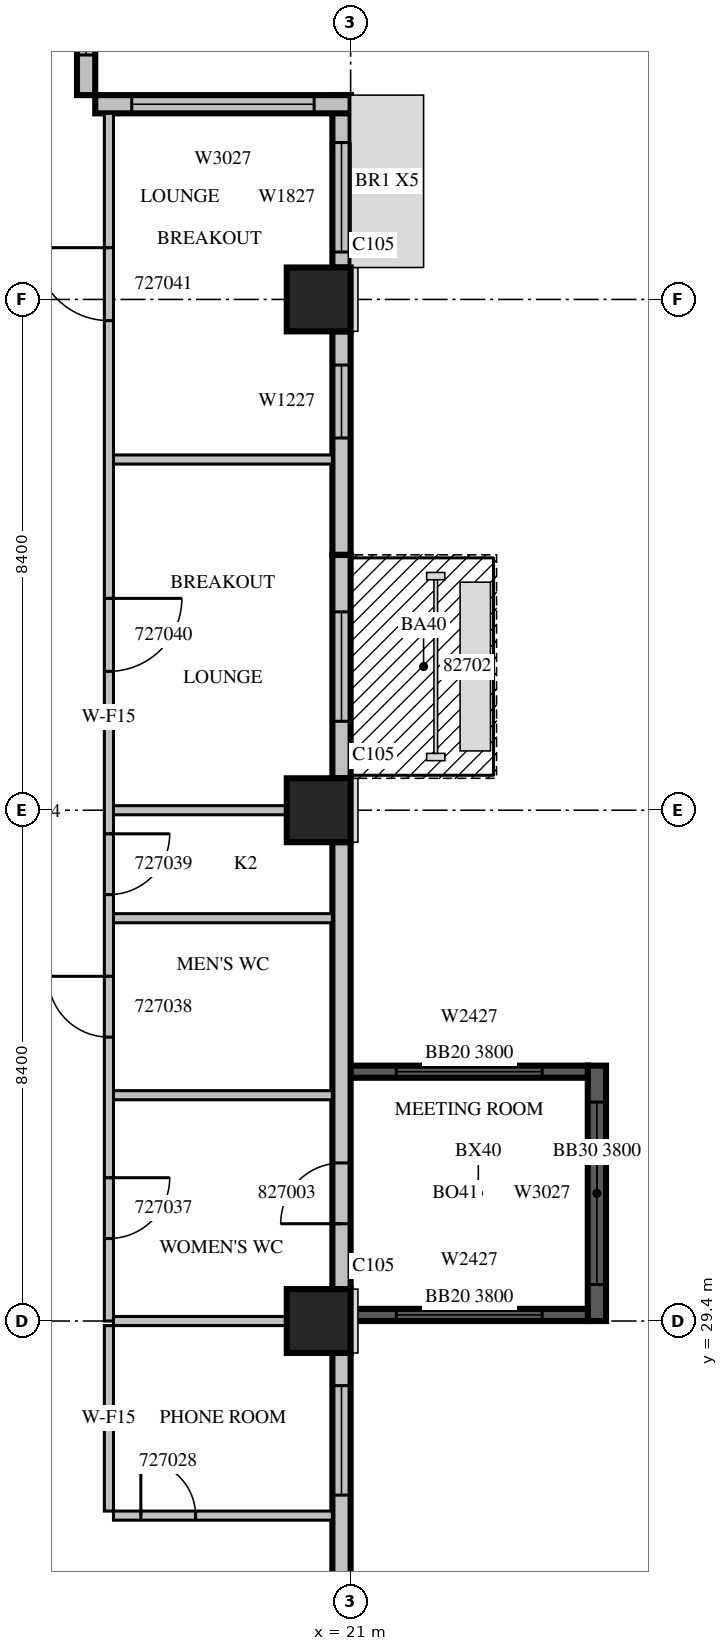
"""IFC4 building model, lengths in metres.
Left out: names, types, materials, properties, quantities, classifications, styles, units other than length and angle.
Written with IfcOpenShell. Run it as: python <this file> out.ifc"""

import sys

from ifc_helpers import new_model, si_unit, direction, frame, frame_2d, origin, origin_2d, place, context, subcontext, project, spatial, rectangle, extrude, source, transform, mapped, element, fill, save


model = new_model("IFC4")
c1 = context("Model", 3, precision=1e-05, world=origin(), true_north=direction((0.0, 1.0)))
c2 = subcontext(c1, "Body", "Model", "MODEL_VIEW")
j1 = project(units=[si_unit("LENGTHUNIT", "METRE"), si_unit("PLANEANGLEUNIT", "RADIAN")], contexts=[c1])
p1 = place(None, origin())
s1 = spatial("IfcSite", under=j1, at=p1, CompositionType="ELEMENT")
p2 = place(p1, origin())
s2 = spatial("IfcBuilding", under=s1, at=p2, CompositionType="ELEMENT")
p3 = place(p2, frame((0.0, 0.0, 124.5)))
s3 = spatial("IfcBuildingStorey", under=s2, at=p3, CompositionType="ELEMENT", Elevation=124.5)
m1 = source(origin(), c2, "Body", "SweptSolid", [
    extrude(rectangle(XDim=1.05, YDim=1.05, at=origin_2d()), origin(), (0.0, 0.0, 1.0), 4.2),
])
for number, where, z_axis, x_axis in (
    (1, (20.475, 29.4, 0.0), (0.0, 0.0, 1.0), (1.0, 0.0, 0.0)),
    (2, (20.475, 37.8, 0.0), (0.0, 0.0, 1.0), (1.0, 0.0, 0.0)),
    (3, (20.475, 46.2, 0.0), (0.0, 0.0, 1.0), (1.0, 0.0, 0.0)),
):
    element("IfcColumn", number, at=place(p3, frame(where, z_axis=z_axis, x_axis=x_axis)), inside=s3, PredefinedType="COLUMN", context=c2, shape_type="MappedRepresentation", body=[
        mapped(m1, transform((0.0, 0.0, 0.0), scale=1.0)),
    ])
m2 = source(origin(), c2, "Body", "SweptSolid", [
    extrude(rectangle(XDim=4.2, YDim=0.3, at=frame_2d((2.1, 0.0))), origin(), (0.0, 0.0, 1.0), 3.8),
])
p4 = place(p3, frame((25.05, 29.4, 0.0), z_axis=(0.0, 0.0, 1.0), x_axis=(0.0, 1.0, 0.0)))
e4 = element("IfcWall", 4, at=p4, inside=s3, PredefinedType="SOLIDWALL", context=c2, shape_type="MappedRepresentation", body=[
    mapped(m2, transform((0.0, 0.0, 0.0), scale=1.0)),
])
m3 = source(origin(), c2, "Body", "SweptSolid", [
    extrude(rectangle(XDim=3.0, YDim=2.7, at=frame_2d((1.5, 1.35))), frame((0.0, 0.16, 0.0), z_axis=(0.0, -1.0, 0.0), x_axis=(1.0, 0.0, 0.0)), (0.0, 0.0, 1.0), 0.32),
])
p5 = place(p4, frame((0.6, 0.0, 0.6)))
e5 = element("IfcOpeningElement", 5, at=p5, cuts=e4, PredefinedType="OPENING", context=c2, shape_type="MappedRepresentation", body=[
    mapped(m3, transform((0.0, 0.0, 0.0), scale=1.0)),
])
m4 = source(origin(), c2, "Body", "SweptSolid", [
    extrude(rectangle(XDim=3.9, YDim=0.2, at=frame_2d((1.95, 0.0))), origin(), (0.0, 0.0, 1.0), 3.8),
])
p6 = place(p3, frame((21.0, 29.5, 0.0), z_axis=(0.0, 0.0, 1.0), x_axis=(1.0, 0.0, 0.0)))
e6 = element("IfcWall", 6, at=p6, inside=s3, PredefinedType="SOLIDWALL", context=c2, shape_type="MappedRepresentation", body=[
    mapped(m4, transform((0.0, 0.0, 0.0), scale=1.0)),
])
m5 = source(origin(), c2, "Body", "SweptSolid", [
    extrude(rectangle(XDim=2.4, YDim=2.7, at=frame_2d((1.2, 1.35))), frame((0.0, 0.11, 0.0), z_axis=(0.0, -1.0, 0.0), x_axis=(1.0, 0.0, 0.0)), (0.0, 0.0, 1.0), 0.22),
])
p7 = place(p6, frame((0.75, 0.0, 0.6)))
e7 = element("IfcOpeningElement", 7, at=p7, cuts=e6, PredefinedType="OPENING", context=c2, shape_type="MappedRepresentation", body=[
    mapped(m5, transform((0.0, 0.0, 0.0), scale=1.0)),
])
p8 = place(p3, frame((21.0, 33.5, 0.0), z_axis=(0.0, 0.0, 1.0), x_axis=(1.0, 0.0, 0.0)))
e8 = element("IfcWall", 8, at=p8, inside=s3, PredefinedType="SOLIDWALL", context=c2, shape_type="MappedRepresentation", body=[
    mapped(m4, transform((0.0, 0.0, 0.0), scale=1.0)),
])
p9 = place(p8, frame((0.75, 0.0, 0.6)))
e9 = element("IfcOpeningElement", 9, at=p9, cuts=e8, PredefinedType="OPENING", context=c2, shape_type="MappedRepresentation", body=[
    mapped(m5, transform((0.0, 0.0, 0.0), scale=1.0)),
])
m6 = source(origin(), c2, "Body", "SweptSolid", [
    extrude(rectangle(XDim=6.875, YDim=0.3, at=frame_2d((3.438, 0.0))), origin(), (0.0, 0.0, 1.0), 3.8),
])
p10 = place(p3, frame((20.85, 22.0, 0.0), z_axis=(0.0, 0.0, 1.0), x_axis=(0.0, 1.0, 0.0)))
e10 = element("IfcWall", 10, at=p10, inside=s3, PredefinedType="STANDARD", context=c2, shape_type="MappedRepresentation", body=[
    mapped(m6, transform((0.0, 0.0, 0.0), scale=1.0)),
])
m7 = source(origin(), c2, "Body", "SweptSolid", [
    extrude(rectangle(XDim=1.8, YDim=2.7, at=frame_2d((0.9, 1.35))), frame((0.0, 0.16, 0.0), z_axis=(0.0, -1.0, 0.0), x_axis=(1.0, 0.0, 0.0)), (0.0, 0.0, 1.0), 0.32),
])
p11 = place(p10, frame((0.2, 0.0, 0.6)))
e11 = element("IfcOpeningElement", 11, at=p11, cuts=e10, PredefinedType="OPENING", context=c2, shape_type="MappedRepresentation", body=[
    mapped(m7, transform((0.0, 0.0, 0.0), scale=1.0)),
])
p12 = place(p10, frame((4.537, 0.0, 0.6)))
e12 = element("IfcOpeningElement", 12, at=p12, cuts=e10, PredefinedType="OPENING", context=c2, shape_type="MappedRepresentation", body=[
    mapped(m7, transform((0.0, 0.0, 0.0), scale=1.0)),
])
m8 = source(origin(), c2, "Body", "SweptSolid", [
    extrude(rectangle(XDim=7.35, YDim=0.3, at=frame_2d((3.675, 0.0))), origin(), (0.0, 0.0, 1.0), 3.8),
])
p13 = place(p3, frame((20.85, 29.925, 0.0), z_axis=(0.0, 0.0, 1.0), x_axis=(0.0, 1.0, 0.0)))
e13 = element("IfcWall", 13, at=p13, inside=s3, PredefinedType="STANDARD", context=c2, shape_type="MappedRepresentation", body=[
    mapped(m8, transform((0.0, 0.0, 0.0), scale=1.0)),
])
m9 = source(origin(), c2, "Body", "SweptSolid", [
    extrude(rectangle(XDim=1.0, YDim=2.1, at=frame_2d((0.5, 1.05))), frame((0.0, 0.16, 0.0), z_axis=(0.0, -1.0, 0.0), x_axis=(1.0, 0.0, 0.0)), (0.0, 0.0, 1.0), 0.32),
])
p14 = place(p13, frame((1.075, 0.0, 0.0)))
e14 = element("IfcOpeningElement", 14, at=p14, cuts=e13, PredefinedType="OPENING", context=c2, shape_type="MappedRepresentation", body=[
    mapped(m9, transform((0.0, 0.0, 0.0), scale=1.0)),
])
m10 = source(origin(), c2, "Body", "SweptSolid", [
    extrude(rectangle(XDim=3.675, YDim=0.3, at=frame_2d((1.837, 0.0))), origin(), (0.0, 0.0, 1.0), 3.8),
])
p15 = place(p3, frame((20.85, 38.325, 0.0), z_axis=(0.0, 0.0, 1.0), x_axis=(0.0, 1.0, 0.0)))
e15 = element("IfcWall", 15, at=p15, inside=s3, PredefinedType="STANDARD", context=c2, shape_type="MappedRepresentation", body=[
    mapped(m10, transform((0.0, 0.0, 0.0), scale=1.0)),
])
m11 = source(origin(), c2, "Body", "SweptSolid", [
    extrude(rectangle(XDim=1.8, YDim=2.4, at=frame_2d((0.9, 1.2))), frame((0.0, 0.16, 0.0), z_axis=(0.0, -1.0, 0.0), x_axis=(1.0, 0.0, 0.0)), (0.0, 0.0, 1.0), 0.32),
])
p16 = place(p15, frame((0.938, 0.0, 0.0)))
e16 = element("IfcOpeningElement", 16, at=p16, cuts=e15, PredefinedType="OPENING", context=c2, shape_type="MappedRepresentation", body=[
    mapped(m11, transform((0.0, 0.0, 0.0), scale=1.0)),
])
p17 = place(p3, frame((20.85, 42.0, 0.0), z_axis=(0.0, 0.0, 1.0), x_axis=(0.0, 1.0, 0.0)))
e17 = element("IfcWall", 17, at=p17, inside=s3, PredefinedType="STANDARD", context=c2, shape_type="MappedRepresentation", body=[
    mapped(m10, transform((0.0, 0.0, 0.0), scale=1.0)),
])
m12 = source(origin(), c2, "Body", "SweptSolid", [
    extrude(rectangle(XDim=1.2, YDim=2.7, at=frame_2d((0.6, 1.35))), frame((0.0, 0.16, 0.0), z_axis=(0.0, -1.0, 0.0), x_axis=(1.0, 0.0, 0.0)), (0.0, 0.0, 1.0), 0.32),
])
p18 = place(p17, frame((1.921, 0.0, 0.6)))
e18 = element("IfcOpeningElement", 18, at=p18, cuts=e17, PredefinedType="OPENING", context=c2, shape_type="MappedRepresentation", body=[
    mapped(m12, transform((0.0, 0.0, 0.0), scale=1.0)),
])
m13 = source(origin(), c2, "Body", "SweptSolid", [
    extrude(rectangle(XDim=2.835, YDim=0.3, at=frame_2d((1.417, 0.0))), origin(), (0.0, 0.0, 1.0), 3.8),
])
p19 = place(p3, frame((20.85, 46.725, 0.0), z_axis=(0.0, 0.0, 1.0), x_axis=(0.0, 1.0, 0.0)))
e19 = element("IfcWall", 19, at=p19, inside=s3, PredefinedType="STANDARD", context=c2, shape_type="MappedRepresentation", body=[
    mapped(m13, transform((0.0, 0.0, 0.0), scale=1.0)),
])
p20 = place(p19, frame((0.255, 0.0, 0.6)))
e20 = element("IfcOpeningElement", 20, at=p20, cuts=e19, PredefinedType="OPENING", context=c2, shape_type="MappedRepresentation", body=[
    mapped(m7, transform((0.0, 0.0, 0.0), scale=1.0)),
])
m14 = source(origin(), c2, "Body", "SweptSolid", [
    extrude(rectangle(XDim=4.2, YDim=0.3, at=frame_2d((2.1, 0.0))), origin(), (0.0, 0.0, 1.0), 3.8),
])
p21 = place(p3, frame((21.0, 49.41, 0.0), z_axis=(0.0, 0.0, 1.0), x_axis=(-1.0, 0.0, 0.0)))
e21 = element("IfcWall", 21, at=p21, inside=s3, PredefinedType="STANDARD", context=c2, shape_type="MappedRepresentation", body=[
    mapped(m14, transform((0.0, 0.0, 0.0), scale=1.0)),
])
p22 = place(p21, frame((0.6, 0.0, 0.6)))
e22 = element("IfcOpeningElement", 22, at=p22, cuts=e21, PredefinedType="OPENING", context=c2, shape_type="MappedRepresentation", body=[
    mapped(m3, transform((0.0, 0.0, 0.0), scale=1.0)),
])
m15 = source(origin(), c2, "Body", "SweptSolid", [
    extrude(rectangle(XDim=2.52, YDim=0.3, at=frame_2d((1.26, 0.0))), origin(), (0.0, 0.0, 1.0), 3.8),
])
p23 = place(p3, frame((16.65, 49.56, 0.0), z_axis=(0.0, 0.0, 1.0), x_axis=(0.0, 1.0, 0.0)))
e23 = element("IfcWall", 23, at=p23, inside=s3, PredefinedType="STANDARD", context=c2, shape_type="MappedRepresentation", body=[
    mapped(m15, transform((0.0, 0.0, 0.0), scale=1.0)),
])
p24 = place(p23, frame((0.66, 0.0, 0.6)))
e24 = element("IfcOpeningElement", 24, at=p24, cuts=e23, PredefinedType="OPENING", context=c2, shape_type="MappedRepresentation", body=[
    mapped(m12, transform((0.0, 0.0, 0.0), scale=1.0)),
])
m16 = source(origin(), c2, "Body", "SweptSolid", [
    extrude(rectangle(XDim=3.6, YDim=0.15, at=frame_2d((1.8, 0.0))), origin(), (0.0, 0.0, 1.0), 3.8),
])
p25 = place(p3, frame((17.1, 26.2, 0.0), z_axis=(0.0, 0.0, 1.0), x_axis=(1.0, 0.0, 0.0)))
e25 = element("IfcWall", 25, at=p25, inside=s3, PredefinedType="PARTITIONING", context=c2, shape_type="MappedRepresentation", body=[
    mapped(m16, transform((0.0, 0.0, 0.0), scale=1.0)),
])
m17 = source(origin(), c2, "Body", "SweptSolid", [
    extrude(rectangle(XDim=0.9, YDim=2.1, at=frame_2d((0.45, 1.05))), frame((0.0, 0.085, 0.0), z_axis=(0.0, -1.0, 0.0), x_axis=(1.0, 0.0, 0.0)), (0.0, 0.0, 1.0), 0.17),
])
p26 = place(p25, frame((0.45, 0.0, 0.0)))
e26 = element("IfcOpeningElement", 26, at=p26, cuts=e25, PredefinedType="OPENING", context=c2, shape_type="MappedRepresentation", body=[
    mapped(m17, transform((0.0, 0.0, 0.0), scale=1.0)),
])
m18 = source(origin(), c2, "Body", "SweptSolid", [
    extrude(rectangle(XDim=3.05, YDim=0.15, at=frame_2d((1.525, 0.0))), origin(), (0.0, 0.0, 1.0), 3.8),
])
p27 = place(p3, frame((17.025, 29.325, 0.0), z_axis=(0.0, 0.0, 1.0), x_axis=(0.0, -1.0, 0.0)))
e27 = element("IfcWall", 27, at=p27, inside=s3, PredefinedType="PARTITIONING", context=c2, shape_type="MappedRepresentation", body=[
    mapped(m18, transform((0.0, 0.0, 0.0), scale=1.0)),
])
m19 = source(origin(), c2, "Body", "SweptSolid", [
    extrude(rectangle(XDim=2.851, YDim=0.15, at=frame_2d((1.425, 0.0))), origin(), (0.0, 0.0, 1.0), 3.8),
])
p28 = place(p3, frame((19.951, 29.4, 0.0), z_axis=(0.0, 0.0, 1.0), x_axis=(-1.0, 0.0, 0.0)))
e28 = element("IfcWall", 28, at=p28, inside=s3, PredefinedType="PARTITIONING", context=c2, shape_type="MappedRepresentation", body=[
    mapped(m19, transform((0.0, 0.0, 0.0), scale=1.0)),
])
for number, where, z_axis, x_axis in (
    (29, (17.1, 33.113, 0.0), (0.0, 0.0, 1.0), (1.0, 0.0, 0.0)),
    (30, (17.1, 36.024, 0.0), (0.0, 0.0, 1.0), (1.0, 0.0, 0.0)),
    (31, (17.1, 43.568, 0.0), (0.0, 0.0, 1.0), (1.0, 0.0, 0.0)),
):
    element("IfcWall", number, at=place(p3, frame(where, z_axis=z_axis, x_axis=x_axis)), inside=s3, PredefinedType="PARTITIONING", context=c2, shape_type="MappedRepresentation", body=[
        mapped(m16, transform((0.0, 0.0, 0.0), scale=1.0)),
    ])
p29 = place(p3, frame((19.951, 37.8, 0.0), z_axis=(0.0, 0.0, 1.0), x_axis=(-1.0, 0.0, 0.0)))
e32 = element("IfcWall", 32, at=p29, inside=s3, PredefinedType="PARTITIONING", context=c2, shape_type="MappedRepresentation", body=[
    mapped(m19, transform((0.0, 0.0, 0.0), scale=1.0)),
])
m20 = source(origin(), c2, "Body", "SweptSolid", [
    extrude(rectangle(XDim=19.86, YDim=0.15, at=frame_2d((9.93, 0.0))), origin(), (0.0, 0.0, 1.0), 3.8),
])
p30 = place(p3, frame((17.025, 49.26, 0.0), z_axis=(0.0, 0.0, 1.0), x_axis=(0.0, -1.0, 0.0)))
e33 = element("IfcWall", 33, at=p30, inside=s3, PredefinedType="PARTITIONING", context=c2, shape_type="MappedRepresentation", body=[
    mapped(m20, transform((0.0, 0.0, 0.0), scale=1.0)),
])
m21 = source(origin(), c2, "Body", "SweptSolid", [
    extrude(rectangle(XDim=1.0, YDim=2.1, at=frame_2d((0.5, 1.05))), frame((0.0, 0.085, 0.0), z_axis=(0.0, -1.0, 0.0), x_axis=(1.0, 0.0, 0.0)), (0.0, 0.0, 1.0), 0.17),
])
p31 = place(p30, frame((17.503, 0.0, 0.0)))
e34 = element("IfcOpeningElement", 34, at=p31, cuts=e33, PredefinedType="OPENING", context=c2, shape_type="MappedRepresentation", body=[
    mapped(m21, transform((0.0, 0.0, 0.0), scale=1.0)),
])
p32 = place(p30, frame((14.191, 0.0, 0.0)))
e35 = element("IfcOpeningElement", 35, at=p32, cuts=e33, PredefinedType="OPENING", context=c2, shape_type="MappedRepresentation", body=[
    mapped(m21, transform((0.0, 0.0, 0.0), scale=1.0)),
])
p33 = place(p30, frame((11.848, 0.0, 0.0)))
e36 = element("IfcOpeningElement", 36, at=p33, cuts=e33, PredefinedType="OPENING", context=c2, shape_type="MappedRepresentation", body=[
    mapped(m21, transform((0.0, 0.0, 0.0), scale=1.0)),
])
m22 = source(origin(), c2, "Body", "SweptSolid", [
    extrude(rectangle(XDim=1.2, YDim=2.1, at=frame_2d((0.6, 1.05))), frame((0.0, 0.085, 0.0), z_axis=(0.0, -1.0, 0.0), x_axis=(1.0, 0.0, 0.0)), (0.0, 0.0, 1.0), 0.17),
])
p34 = place(p30, frame((7.976, 0.0, 0.0)))
e37 = element("IfcOpeningElement", 37, at=p34, cuts=e33, PredefinedType="OPENING", context=c2, shape_type="MappedRepresentation", body=[
    mapped(m22, transform((0.0, 0.0, 0.0), scale=1.0)),
])
p35 = place(p30, frame((2.209, 0.0, 0.0)))
e38 = element("IfcOpeningElement", 38, at=p35, cuts=e33, PredefinedType="OPENING", context=c2, shape_type="MappedRepresentation", body=[
    mapped(m22, transform((0.0, 0.0, 0.0), scale=1.0)),
])
m23 = source(origin(), c2, "Body", "SweptSolid", [
    extrude(rectangle(XDim=3.0, YDim=2.7, at=frame_2d((1.5, 1.35))), frame((0.0, 0.03, 0.0), z_axis=(0.0, -1.0, 0.0), x_axis=(1.0, 0.0, 0.0)), (0.0, 0.0, 1.0), 0.06),
])
p36 = place(p5, origin())
e39 = element("IfcWindow", 39, at=p36, inside=s3, PartitioningType="SINGLE_PANEL", PredefinedType="WINDOW", context=c2, shape_type="MappedRepresentation", body=[
    mapped(m23, transform((0.0, 0.0, 0.0), scale=1.0)),
])
fill(e5, e39)
m24 = source(origin(), c2, "Body", "SweptSolid", [
    extrude(rectangle(XDim=2.4, YDim=2.7, at=frame_2d((1.2, 1.35))), frame((0.0, 0.03, 0.0), z_axis=(0.0, -1.0, 0.0), x_axis=(1.0, 0.0, 0.0)), (0.0, 0.0, 1.0), 0.06),
])
p37 = place(p7, origin())
e40 = element("IfcWindow", 40, at=p37, inside=s3, PartitioningType="SINGLE_PANEL", PredefinedType="WINDOW", context=c2, shape_type="MappedRepresentation", body=[
    mapped(m24, transform((0.0, 0.0, 0.0), scale=1.0)),
])
fill(e7, e40)
p38 = place(p9, origin())
e41 = element("IfcWindow", 41, at=p38, inside=s3, PartitioningType="SINGLE_PANEL", PredefinedType="WINDOW", context=c2, shape_type="MappedRepresentation", body=[
    mapped(m24, transform((0.0, 0.0, 0.0), scale=1.0)),
])
fill(e9, e41)
m25 = source(origin(), c2, "Body", "SweptSolid", [
    extrude(rectangle(XDim=1.8, YDim=2.7, at=frame_2d((0.9, 1.35))), frame((0.0, 0.03, 0.0), z_axis=(0.0, -1.0, 0.0), x_axis=(1.0, 0.0, 0.0)), (0.0, 0.0, 1.0), 0.06),
])
p39 = place(p12, origin())
e42 = element("IfcWindow", 42, at=p39, inside=s3, PartitioningType="SINGLE_PANEL", PredefinedType="WINDOW", context=c2, shape_type="MappedRepresentation", body=[
    mapped(m25, transform((0.0, 0.0, 0.0), scale=1.0)),
])
fill(e12, e42)
m26 = source(origin(), c2, "Body", "SweptSolid", [
    extrude(rectangle(XDim=1.8, YDim=2.4, at=frame_2d((0.9, 1.2))), frame((0.0, 0.025, 0.0), z_axis=(0.0, -1.0, 0.0), x_axis=(1.0, 0.0, 0.0)), (0.0, 0.0, 1.0), 0.05),
])
p40 = place(p16, origin())
e43 = element("IfcDoor", 43, at=p40, inside=s3, OperationType="SLIDING_TO_LEFT", PredefinedType="DOOR", context=c2, shape_type="MappedRepresentation", body=[
    mapped(m26, transform((0.0, 0.0, 0.0), scale=1.0)),
])
fill(e16, e43)
m27 = source(origin(), c2, "Body", "SweptSolid", [
    extrude(rectangle(XDim=1.2, YDim=2.7, at=frame_2d((0.6, 1.35))), frame((0.0, 0.03, 0.0), z_axis=(0.0, -1.0, 0.0), x_axis=(1.0, 0.0, 0.0)), (0.0, 0.0, 1.0), 0.06),
])
p41 = place(p18, origin())
e44 = element("IfcWindow", 44, at=p41, inside=s3, PartitioningType="SINGLE_PANEL", PredefinedType="WINDOW", context=c2, shape_type="MappedRepresentation", body=[
    mapped(m27, transform((0.0, 0.0, 0.0), scale=1.0)),
])
fill(e18, e44)
p42 = place(p20, origin())
e45 = element("IfcWindow", 45, at=p42, inside=s3, PartitioningType="SINGLE_PANEL", PredefinedType="WINDOW", context=c2, shape_type="MappedRepresentation", body=[
    mapped(m25, transform((0.0, 0.0, 0.0), scale=1.0)),
])
fill(e20, e45)
p43 = place(p22, origin())
e46 = element("IfcWindow", 46, at=p43, inside=s3, PartitioningType="SINGLE_PANEL", PredefinedType="WINDOW", context=c2, shape_type="MappedRepresentation", body=[
    mapped(m23, transform((0.0, 0.0, 0.0), scale=1.0)),
])
fill(e22, e46)
p44 = place(p24, origin())
e47 = element("IfcWindow", 47, at=p44, inside=s3, PartitioningType="SINGLE_PANEL", PredefinedType="WINDOW", context=c2, shape_type="MappedRepresentation", body=[
    mapped(m27, transform((0.0, 0.0, 0.0), scale=1.0)),
])
fill(e24, e47)
m28 = source(origin(), c2, "Body", "SweptSolid", [
    extrude(rectangle(XDim=0.9, YDim=2.1, at=frame_2d((0.45, 1.05))), frame((0.0, 0.025, 0.0), z_axis=(0.0, -1.0, 0.0), x_axis=(1.0, 0.0, 0.0)), (0.0, 0.0, 1.0), 0.05),
])
p45 = place(p26, origin())
e48 = element("IfcDoor", 48, at=p45, inside=s3, OperationType="SINGLE_SWING_LEFT", PredefinedType="DOOR", context=c2, shape_type="MappedRepresentation", body=[
    mapped(m28, transform((0.0, 0.0, 0.0), scale=1.0)),
])
fill(e26, e48)
m29 = source(origin(), c2, "Body", "SweptSolid", [
    extrude(rectangle(XDim=1.0, YDim=2.1, at=frame_2d((0.5, 1.05))), frame((0.0, 0.025, 0.0), z_axis=(0.0, -1.0, 0.0), x_axis=(1.0, 0.0, 0.0)), (0.0, 0.0, 1.0), 0.05),
])
p46 = place(p31, origin())
e49 = element("IfcDoor", 49, at=p46, inside=s3, OperationType="SINGLE_SWING_LEFT", PredefinedType="DOOR", context=c2, shape_type="MappedRepresentation", body=[
    mapped(m29, transform((0.0, 0.0, 0.0), scale=1.0)),
])
fill(e34, e49)
p47 = place(p32, origin())
e50 = element("IfcDoor", 50, at=p47, inside=s3, OperationType="SINGLE_SWING_RIGHT", PredefinedType="DOOR", context=c2, shape_type="MappedRepresentation", body=[
    mapped(m29, transform((0.0, 0.0, 0.0), scale=1.0)),
])
fill(e35, e50)
p48 = place(p33, origin())
e51 = element("IfcDoor", 51, at=p48, inside=s3, OperationType="SINGLE_SWING_LEFT", PredefinedType="DOOR", context=c2, shape_type="MappedRepresentation", body=[
    mapped(m29, transform((0.0, 0.0, 0.0), scale=1.0)),
])
fill(e36, e51)
m30 = source(origin(), c2, "Body", "SweptSolid", [
    extrude(rectangle(XDim=1.2, YDim=2.1, at=frame_2d((0.6, 1.05))), frame((0.0, 0.025, 0.0), z_axis=(0.0, -1.0, 0.0), x_axis=(1.0, 0.0, 0.0)), (0.0, 0.0, 1.0), 0.05),
])
p49 = place(p34, origin())
e52 = element("IfcDoor", 52, at=p49, inside=s3, OperationType="SINGLE_SWING_LEFT", PredefinedType="DOOR", context=c2, shape_type="MappedRepresentation", body=[
    mapped(m30, transform((0.0, 0.0, 0.0), scale=1.0)),
])
fill(e37, e52)
p50 = place(p35, origin())
e53 = element("IfcDoor", 53, at=p50, inside=s3, OperationType="SINGLE_SWING_RIGHT", PredefinedType="DOOR", context=c2, shape_type="MappedRepresentation", body=[
    mapped(m30, transform((0.0, 0.0, 0.0), scale=1.0)),
])
fill(e38, e53)
p51 = place(p14, origin())
e54 = element("IfcDoor", 54, at=p51, inside=s3, OperationType="SINGLE_SWING_LEFT", PredefinedType="DOOR", context=c2, shape_type="MappedRepresentation", body=[
    mapped(m29, transform((0.0, 0.0, 0.0), scale=1.0)),
])
fill(e14, e54)
save(model, sys.argv[1])
